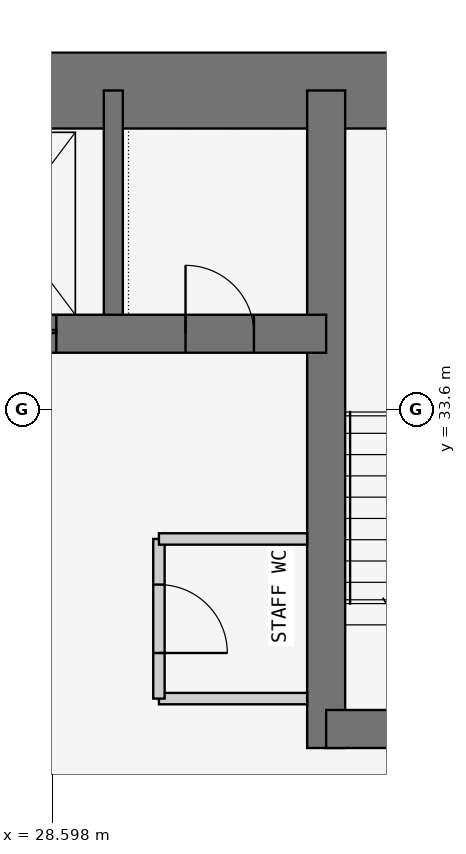
"""IFC4 building model, lengths in metres.
Left out: names, types, materials, properties, quantities, classifications, styles, units other than length and angle.
Written with IfcOpenShell. Run it as: python <this file> out.ifc"""

import sys

from ifc_helpers import new_model, si_unit, direction, frame, frame_2d, origin, place, context, subcontext, project, spatial, rectangle, extrude, element, fill, save


model = new_model("IFC4")
c1 = context("Model", 3, precision=1e-05, world=origin(), true_north=direction((0.0, 1.0)))
c2 = subcontext(c1, "Body", "Model", "MODEL_VIEW")
j1 = project(units=[si_unit("LENGTHUNIT", "METRE"), si_unit("PLANEANGLEUNIT", "RADIAN")], contexts=[c1])
p1 = place(None, origin())
s1 = spatial("IfcSite", under=j1, at=p1, CompositionType="ELEMENT")
p2 = place(p1, origin())
s2 = spatial("IfcBuilding", under=s1, at=p2, CompositionType="ELEMENT")
p3 = place(p2, frame((0.0, 0.0, 63.3)))
s3 = spatial("IfcBuildingStorey", under=s2, at=p3, CompositionType="ELEMENT", Elevation=63.3)
p4 = place(p3, frame((37.8, 37.8, 0.0), z_axis=(0.0, 0.0, 1.0), x_axis=(-1.0, 0.0, 0.0)))
e1 = element("IfcWall", 1, at=p4, inside=s3, PredefinedType="SHEAR", context=c2, shape_type="SweptSolid", body=[
    extrude(rectangle(XDim=17.3, YDim=1.0, at=frame_2d((8.65, 0.0))), origin(), (0.0, 0.0, 1.0), 3.6),
])
p5 = place(p3, frame((21.0, 34.6, 0.0), z_axis=(0.0, 0.0, 1.0), x_axis=(1.0, 0.0, 0.0)))
e2 = element("IfcWall", 2, at=p5, inside=s3, PredefinedType="SHEAR", context=c2, shape_type="SweptSolid", body=[
    extrude(rectangle(XDim=11.2, YDim=0.5, at=frame_2d((5.6, 0.0))), origin(), (0.0, 0.0, 1.0), 3.6),
])
p6 = place(p5, frame((9.35, 0.0, 0.0)))
e3 = element("IfcOpeningElement", 3, at=p6, cuts=e2, PredefinedType="OPENING", context=c2, shape_type="SweptSolid", body=[
    extrude(rectangle(XDim=0.9, YDim=2.1, at=frame_2d((0.45, 1.05))), frame((0.0, 0.26, 0.0), z_axis=(0.0, -1.0, 0.0), x_axis=(1.0, 0.0, 0.0)), (0.0, 0.0, 1.0), 0.52),
])
p7 = place(p5, frame((1.0, 0.0, 0.0)))
e4 = element("IfcOpeningElement", 4, at=p7, cuts=e2, PredefinedType="OPENING", context=c2, shape_type="SweptSolid", body=[
    extrude(rectangle(XDim=1.1, YDim=2.1, at=frame_2d((0.55, 1.05))), frame((0.0, 0.26, 0.0), z_axis=(0.0, -1.0, 0.0), x_axis=(1.0, 0.0, 0.0)), (0.0, 0.0, 1.0), 0.52),
])
p8 = place(p5, frame((3.65, 0.0, 0.0)))
e5 = element("IfcOpeningElement", 5, at=p8, cuts=e2, PredefinedType="OPENING", context=c2, shape_type="SweptSolid", body=[
    extrude(rectangle(XDim=1.1, YDim=2.1, at=frame_2d((0.55, 1.05))), frame((0.0, 0.26, 0.0), z_axis=(0.0, -1.0, 0.0), x_axis=(1.0, 0.0, 0.0)), (0.0, 0.0, 1.0), 0.52),
])
p9 = place(p5, frame((6.35, 0.0, 0.0)))
e6 = element("IfcOpeningElement", 6, at=p9, cuts=e2, PredefinedType="OPENING", context=c2, shape_type="SweptSolid", body=[
    extrude(rectangle(XDim=1.3, YDim=2.1, at=frame_2d((0.65, 1.05))), frame((0.0, 0.26, 0.0), z_axis=(0.0, -1.0, 0.0), x_axis=(1.0, 0.0, 0.0)), (0.0, 0.0, 1.0), 0.52),
])
p10 = place(p3, frame((32.2, 29.15, 0.0), z_axis=(0.0, 0.0, 1.0), x_axis=(0.0, 1.0, 0.0)))
e7 = element("IfcWall", 7, at=p10, inside=s3, PredefinedType="SHEAR", context=c2, shape_type="SweptSolid", body=[
    extrude(rectangle(XDim=8.65, YDim=0.5, at=frame_2d((4.325, 0.0))), origin(), (0.0, 0.0, 1.0), 3.6),
])
p11 = place(p3, frame((32.2, 29.4, 0.0), z_axis=(0.0, 0.0, 1.0), x_axis=(1.0, 0.0, 0.0)))
e8 = element("IfcWall", 8, at=p11, inside=s3, PredefinedType="SHEAR", context=c2, shape_type="SweptSolid", body=[
    extrude(rectangle(XDim=5.6, YDim=0.5, at=frame_2d((2.8, 0.0))), origin(), (0.0, 0.0, 1.0), 3.6),
])
p12 = place(p11, frame((2.0, 0.0, 0.0)))
e9 = element("IfcOpeningElement", 9, at=p12, cuts=e8, PredefinedType="OPENING", context=c2, shape_type="SweptSolid", body=[
    extrude(rectangle(XDim=1.2, YDim=2.1, at=frame_2d((0.6, 1.05))), frame((0.0, 0.26, 0.0), z_axis=(0.0, -1.0, 0.0), x_axis=(1.0, 0.0, 0.0)), (0.0, 0.0, 1.0), 0.52),
])
p13 = place(p3, frame((29.4, 34.6, 0.0), z_axis=(0.0, 0.0, 1.0), x_axis=(0.0, 1.0, 0.0)))
e10 = element("IfcWall", 10, at=p13, inside=s3, PredefinedType="SHEAR", context=c2, shape_type="SweptSolid", body=[
    extrude(rectangle(XDim=3.2, YDim=0.25, at=frame_2d((1.6, 0.0))), origin(), (0.0, 0.0, 1.0), 3.6),
])
p14 = place(p3, frame((31.95, 29.8, 0.0), z_axis=(0.0, 0.0, 1.0), x_axis=(-1.0, 0.0, 0.0)))
e11 = element("IfcWall", 11, at=p14, inside=s3, PredefinedType="PARTITIONING", context=c2, shape_type="SweptSolid", body=[
    extrude(rectangle(XDim=1.95, YDim=0.15, at=frame_2d((0.975, 0.0))), origin(), (0.0, 0.0, 1.0), 3.45),
])
p15 = place(p3, frame((30.0, 29.8, 0.0), z_axis=(0.0, 0.0, 1.0), x_axis=(0.0, 1.0, 0.0)))
e12 = element("IfcWall", 12, at=p15, inside=s3, PredefinedType="PARTITIONING", context=c2, shape_type="SweptSolid", body=[
    extrude(rectangle(XDim=2.1, YDim=0.15, at=frame_2d((1.05, 0.0))), origin(), (0.0, 0.0, 1.0), 3.45),
])
p16 = place(p15, frame((0.6, 0.0, 0.0)))
e13 = element("IfcOpeningElement", 13, at=p16, cuts=e12, PredefinedType="OPENING", context=c2, shape_type="SweptSolid", body=[
    extrude(rectangle(XDim=0.9, YDim=2.1, at=frame_2d((0.45, 1.05))), frame((0.0, 0.085, 0.0), z_axis=(0.0, -1.0, 0.0), x_axis=(1.0, 0.0, 0.0)), (0.0, 0.0, 1.0), 0.17),
])
p17 = place(p3, frame((30.0, 31.9, 0.0), z_axis=(0.0, 0.0, 1.0), x_axis=(1.0, 0.0, 0.0)))
e14 = element("IfcWall", 14, at=p17, inside=s3, PredefinedType="PARTITIONING", context=c2, shape_type="SweptSolid", body=[
    extrude(rectangle(XDim=1.95, YDim=0.15, at=frame_2d((0.975, 0.0))), origin(), (0.0, 0.0, 1.0), 3.45),
])
p18 = place(p6, origin())
e15 = element("IfcDoor", 15, at=p18, inside=s3, OperationType="SINGLE_SWING_LEFT", PredefinedType="DOOR", context=c2, shape_type="SweptSolid", body=[
    extrude(rectangle(XDim=0.9, YDim=2.1, at=frame_2d((0.45, 1.05))), frame((0.0, 0.025, 0.0), z_axis=(0.0, -1.0, 0.0), x_axis=(1.0, 0.0, 0.0)), (0.0, 0.0, 1.0), 0.05),
])
fill(e3, e15)
p19 = place(p16, frame((0.9, 0.0, 0.0), z_axis=(0.0, 0.0, 1.0), x_axis=(-1.0, 0.0, 0.0)))
e16 = element("IfcDoor", 16, at=p19, inside=s3, OperationType="SINGLE_SWING_RIGHT", PredefinedType="DOOR", context=c2, shape_type="SweptSolid", body=[
    extrude(rectangle(XDim=0.9, YDim=2.1, at=frame_2d((0.45, 1.05))), frame((0.0, 0.025, 0.0), z_axis=(0.0, -1.0, 0.0), x_axis=(1.0, 0.0, 0.0)), (0.0, 0.0, 1.0), 0.05),
])
fill(e13, e16)
p20 = place(p9, origin())
e17 = element("IfcDoor", 17, at=p20, inside=s3, OperationType="DOUBLE_DOOR_SLIDING", PredefinedType="DOOR", context=c2, shape_type="SweptSolid", body=[
    extrude(rectangle(XDim=1.3, YDim=2.1, at=frame_2d((0.65, 1.05))), frame((0.0, 0.025, 0.0), z_axis=(0.0, -1.0, 0.0), x_axis=(1.0, 0.0, 0.0)), (0.0, 0.0, 1.0), 0.05),
])
fill(e6, e17)
save(model, sys.argv[1])
